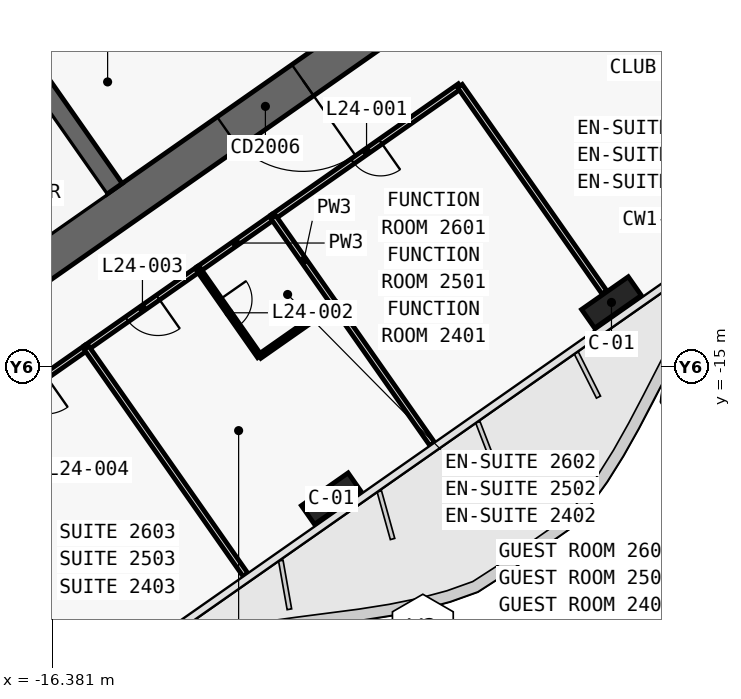
"""IFC4 building model, lengths in metres.
Left out: names, types, materials, properties, quantities, classifications, styles, units other than length and angle.
Written with IfcOpenShell. Run it as: python <this file> out.ifc"""

import sys

from ifc_helpers import new_model, si_unit, direction, frame, frame_2d, origin, origin_2d, place, context, subcontext, project, spatial, polyline, rectangle, outline, extrude, element, fill, save


model = new_model("IFC4")
c1 = context("Model", 3, precision=1e-05, world=origin(), true_north=direction((0.0, 1.0)))
c2 = subcontext(c1, "Body", "Model", "MODEL_VIEW")
j1 = project(units=[si_unit("LENGTHUNIT", "METRE"), si_unit("PLANEANGLEUNIT", "RADIAN")], contexts=[c1])
p1 = place(None, origin())
s1 = spatial("IfcSite", under=j1, at=p1, CompositionType="ELEMENT")
p2 = place(p1, origin())
s2 = spatial("IfcBuilding", under=s1, at=p2, CompositionType="ELEMENT")
p3 = place(p2, frame((0.0, 0.0, 112.1)))
s3 = spatial("IfcBuildingStorey", under=s2, at=p3, CompositionType="ELEMENT", Elevation=112.1)
p4 = place(p3, frame((0.037, 11.867, 0.0), z_axis=(0.0, 0.0, 1.0), x_axis=(-0.819155306259, -0.573571777746, 0.0)))
e1 = element("IfcWall", 1, at=p4, inside=s3, PredefinedType="SHEAR", context=c2, shape_type="SweptSolid", body=[
    extrude(outline(polyline([(33.837, 0.5), (0.7, 0.5), (0.0, -0.5), (33.837, -0.5), (33.837, 0.5)])), origin(), (0.0, 0.0, 1.0), 3.6),
])
p5 = place(p3, frame((0.037, -0.585, 0.0), z_axis=(0.0, 0.0, 1.0), x_axis=(-0.819157152511, -0.573569140985, 0.0)))
e2 = element("IfcWall", 2, at=p5, inside=s3, PredefinedType="SHEAR", context=c2, shape_type="SweptSolid", body=[
    extrude(outline(polyline([(26.695, 0.5), (0.7, 0.5), (0.0, -0.5), (26.695, -0.5), (26.695, 0.5)])), origin(), (0.0, 0.0, 1.0), 3.6),
])
p6 = place(p5, frame((2.995, 0.0, 0.0)))
e3 = element("IfcOpeningElement", 3, at=p6, cuts=e2, PredefinedType="OPENING", context=c2, shape_type="SweptSolid", body=[
    extrude(rectangle(XDim=2.4, YDim=2.1, at=frame_2d((1.2, 1.05))), frame((0.0, 0.51, 0.0), z_axis=(0.0, -1.0, 0.0), x_axis=(1.0, 0.0, 0.0)), (0.0, 0.0, 1.0), 1.02),
])
p7 = place(p5, frame((11.995, 0.0, 0.0)))
e4 = element("IfcOpeningElement", 4, at=p7, cuts=e2, PredefinedType="OPENING", context=c2, shape_type="SweptSolid", body=[
    extrude(rectangle(XDim=2.4, YDim=2.1, at=frame_2d((1.2, 1.05))), frame((0.0, 0.51, 0.0), z_axis=(0.0, -1.0, 0.0), x_axis=(1.0, 0.0, 0.0)), (0.0, 0.0, 1.0), 1.02),
])
p8 = place(p3, frame((-14.745, -10.324, 0.0), z_axis=(0.0, 0.0, 1.0), x_axis=(-0.57356780395, 0.819158088694, 0.0)))
e5 = element("IfcWall", 5, at=p8, inside=s3, PredefinedType="SHEAR", context=c2, shape_type="SweptSolid", body=[
    extrude(outline(polyline([(4.35, 0.25), (0.0, 0.25), (0.0, -0.25), (4.35, -0.25), (4.35, 0.25)])), origin(), (0.0, 0.0, 1.0), 3.6),
])
p9 = place(p3, frame((-2.638, 3.768, 0.0), z_axis=(0.0, 0.0, 1.0), x_axis=(-0.819148977158, -0.573580816643, 0.0)))
e6 = element("IfcWall", 6, at=p9, inside=s3, PredefinedType="SHEAR", context=c2, shape_type="SweptSolid", body=[
    extrude(outline(polyline([(26.0, 0.25), (0.0, 0.25), (0.0, -0.25), (26.0, -0.25), (26.0, 0.25)])), origin(), (0.0, 0.0, 1.0), 3.6),
])
p10 = place(p9, frame((1.169, 0.0, 0.0)))
e7 = element("IfcOpeningElement", 7, at=p10, cuts=e6, PredefinedType="OPENING", context=c2, shape_type="SweptSolid", body=[
    extrude(rectangle(XDim=1.1, YDim=2.1, at=frame_2d((0.55, 1.05))), frame((0.0, 0.26, 0.0), z_axis=(0.0, -1.0, 0.0), x_axis=(1.0, 0.0, 0.0)), (0.0, 0.0, 1.0), 0.52),
])
p11 = place(p9, frame((3.206, 0.0, 0.0)))
e8 = element("IfcOpeningElement", 8, at=p11, cuts=e6, PredefinedType="OPENING", context=c2, shape_type="SweptSolid", body=[
    extrude(rectangle(XDim=1.1, YDim=2.1, at=frame_2d((0.55, 1.05))), frame((0.0, 0.26, 0.0), z_axis=(0.0, -1.0, 0.0), x_axis=(1.0, 0.0, 0.0)), (0.0, 0.0, 1.0), 0.52),
])
p12 = place(p9, frame((5.244, 0.0, 0.0)))
e9 = element("IfcOpeningElement", 9, at=p12, cuts=e6, PredefinedType="OPENING", context=c2, shape_type="SweptSolid", body=[
    extrude(rectangle(XDim=1.1, YDim=2.1, at=frame_2d((0.55, 1.05))), frame((0.0, 0.26, 0.0), z_axis=(0.0, -1.0, 0.0), x_axis=(1.0, 0.0, 0.0)), (0.0, 0.0, 1.0), 0.52),
])
p13 = place(p9, frame((7.281, 0.0, 0.0)))
e10 = element("IfcOpeningElement", 10, at=p13, cuts=e6, PredefinedType="OPENING", context=c2, shape_type="SweptSolid", body=[
    extrude(rectangle(XDim=1.1, YDim=2.1, at=frame_2d((0.55, 1.05))), frame((0.0, 0.26, 0.0), z_axis=(0.0, -1.0, 0.0), x_axis=(1.0, 0.0, 0.0)), (0.0, 0.0, 1.0), 0.52),
])
p14 = place(p9, frame((9.688, 0.0, 0.0)))
e11 = element("IfcOpeningElement", 11, at=p14, cuts=e6, PredefinedType="OPENING", context=c2, shape_type="SweptSolid", body=[
    extrude(rectangle(XDim=1.1, YDim=2.1, at=frame_2d((0.55, 1.05))), frame((0.0, 0.26, 0.0), z_axis=(0.0, -1.0, 0.0), x_axis=(1.0, 0.0, 0.0)), (0.0, 0.0, 1.0), 0.52),
])
p15 = place(p9, frame((11.863, 0.0, 0.0)))
e12 = element("IfcOpeningElement", 12, at=p15, cuts=e6, PredefinedType="OPENING", context=c2, shape_type="SweptSolid", body=[
    extrude(rectangle(XDim=1.1, YDim=2.1, at=frame_2d((0.55, 1.05))), frame((0.0, 0.26, 0.0), z_axis=(0.0, -1.0, 0.0), x_axis=(1.0, 0.0, 0.0)), (0.0, 0.0, 1.0), 0.52),
])
p16 = place(p9, frame((14.038, 0.0, 0.0)))
e13 = element("IfcOpeningElement", 13, at=p16, cuts=e6, PredefinedType="OPENING", context=c2, shape_type="SweptSolid", body=[
    extrude(rectangle(XDim=1.1, YDim=2.1, at=frame_2d((0.55, 1.05))), frame((0.0, 0.26, 0.0), z_axis=(0.0, -1.0, 0.0), x_axis=(1.0, 0.0, 0.0)), (0.0, 0.0, 1.0), 0.52),
])
p17 = place(p9, frame((16.212, 0.0, 0.0)))
e14 = element("IfcOpeningElement", 14, at=p17, cuts=e6, PredefinedType="OPENING", context=c2, shape_type="SweptSolid", body=[
    extrude(rectangle(XDim=1.1, YDim=2.1, at=frame_2d((0.55, 1.05))), frame((0.0, 0.26, 0.0), z_axis=(0.0, -1.0, 0.0), x_axis=(1.0, 0.0, 0.0)), (0.0, 0.0, 1.0), 0.52),
])
for number, where, z_axis, x_axis in (
    (15, (-1.665, -13.313, 0.0), (0.0, 0.0, 1.0), (-0.819, -0.574, 0.0)),
    (16, (-9.038, -18.475, 0.0), (0.0, 0.0, 1.0), (-0.819, -0.574, 0.0)),
):
    element("IfcColumn", number, at=place(p3, frame(where, z_axis=z_axis, x_axis=x_axis)), inside=s3, PredefinedType="COLUMN", context=c2, shape_type="SweptSolid", body=[
        extrude(rectangle(XDim=1.5, YDim=0.6, at=origin_2d()), origin(), (0.0, 0.0, 1.0), 3.6),
    ])
p18 = place(p3, frame((-5.652, -7.62, 0.0), z_axis=(0.0, 0.0, 1.0), x_axis=(-0.819147828287, -0.573582457378, 0.0)))
e17 = element("IfcWall", 17, at=p18, inside=s3, PredefinedType="PARTITIONING", context=c2, shape_type="SweptSolid", body=[
    extrude(rectangle(XDim=6.002, YDim=0.15, at=frame_2d((3.001, 0.0))), origin(), (0.0, 0.0, 1.0), 2.6),
])
p19 = place(p18, frame((2.551, 0.0, 0.0)))
e18 = element("IfcOpeningElement", 18, at=p19, cuts=e17, PredefinedType="OPENING", context=c2, shape_type="SweptSolid", body=[
    extrude(rectangle(XDim=0.9, YDim=2.1, at=frame_2d((0.45, 1.05))), frame((0.0, 0.085, 0.0), z_axis=(0.0, -1.0, 0.0), x_axis=(1.0, 0.0, 0.0)), (0.0, 0.0, 1.0), 0.17),
])
p20 = place(p3, frame((-12.532, -12.437, 0.0), z_axis=(0.0, 0.0, 1.0), x_axis=(-0.819145961204, -0.573585123798, 0.0)))
e19 = element("IfcWall", 19, at=p20, inside=s3, PredefinedType="PARTITIONING", context=c2, shape_type="SweptSolid", body=[
    extrude(rectangle(XDim=3.603, YDim=0.15, at=frame_2d((1.802, 0.0))), origin(), (0.0, 0.0, 1.0), 2.6),
])
p21 = place(p20, frame((1.301, 0.0, 0.0)))
e20 = element("IfcOpeningElement", 20, at=p21, cuts=e19, PredefinedType="OPENING", context=c2, shape_type="SweptSolid", body=[
    extrude(rectangle(XDim=1.0, YDim=2.1, at=frame_2d((0.5, 1.05))), frame((0.0, 0.085, 0.0), z_axis=(0.0, -1.0, 0.0), x_axis=(1.0, 0.0, 0.0)), (0.0, 0.0, 1.0), 0.17),
])
p22 = place(p3, frame((-10.565, -11.06, 0.0), z_axis=(0.0, 0.0, 1.0), x_axis=(-0.819193748, -0.57351687267, 0.0)))
e21 = element("IfcWall", 21, at=p22, inside=s3, PredefinedType="PARTITIONING", context=c2, shape_type="SweptSolid", body=[
    extrude(rectangle(XDim=2.404, YDim=0.15, at=frame_2d((1.202, 0.0))), origin(), (0.0, 0.0, 1.0), 3.32),
])
p23 = place(p3, frame((-15.48, -14.501, 0.0), z_axis=(0.0, 0.0, 1.0), x_axis=(-0.819145961204, -0.573585123798, 0.0)))
e22 = element("IfcWall", 22, at=p23, inside=s3, PredefinedType="PARTITIONING", context=c2, shape_type="SweptSolid", body=[
    extrude(rectangle(XDim=3.603, YDim=0.15, at=frame_2d((1.802, 0.0))), origin(), (0.0, 0.0, 1.0), 3.32),
])
p24 = place(p23, frame((1.302, 0.0, 0.0)))
e23 = element("IfcOpeningElement", 23, at=p24, cuts=e22, PredefinedType="OPENING", context=c2, shape_type="SweptSolid", body=[
    extrude(rectangle(XDim=1.0, YDim=2.1, at=frame_2d((0.5, 1.05))), frame((0.0, 0.085, 0.0), z_axis=(0.0, -1.0, 0.0), x_axis=(1.0, 0.0, 0.0)), (0.0, 0.0, 1.0), 0.17),
])
p25 = place(p3, frame((-1.849, -13.051, 0.0), z_axis=(0.0, 0.0, 1.0), x_axis=(-0.573575988258, 0.819152358047, 0.0)))
e24 = element("IfcWall", 24, at=p25, inside=s3, PredefinedType="PARTITIONING", context=c2, shape_type="SweptSolid", body=[
    extrude(rectangle(XDim=6.632, YDim=0.15, at=frame_2d((3.316, 0.0))), origin(), (0.0, 0.0, 1.0), 2.6),
])
p26 = place(p3, frame((-6.379, -17.041, 0.0), z_axis=(0.0, 0.0, 1.0), x_axis=(-0.573593387921, 0.81914017441, 0.0)))
e25 = element("IfcWall", 25, at=p26, inside=s3, PredefinedType="PARTITIONING", context=c2, shape_type="SweptSolid", body=[
    extrude(rectangle(XDim=4.501, YDim=0.15, at=frame_2d((2.25, 0.0))), origin(), (0.0, 0.0, 1.0), 2.5),
])
p27 = place(p3, frame((-8.959, -13.356, 0.0), z_axis=(0.0, 0.0, 1.0), x_axis=(-0.573555899632, 0.819166423871, 0.0)))
e26 = element("IfcWall", 26, at=p27, inside=s3, PredefinedType="PARTITIONING", context=c2, shape_type="SweptSolid", body=[
    extrude(rectangle(XDim=2.802, YDim=0.15, at=frame_2d((1.401, 0.0))), origin(), (0.0, 0.0, 1.0), 3.32),
])
p28 = place(p3, frame((-12.533, -12.438, 0.0), z_axis=(0.0, 0.0, 1.0), x_axis=(0.573550118428, -0.819170471667, 0.0)))
e27 = element("IfcWall", 27, at=p28, inside=s3, PredefinedType="PARTITIONING", context=c2, shape_type="SweptSolid", body=[
    extrude(rectangle(XDim=2.8, YDim=0.12, at=frame_2d((1.4, 0.0))), origin(), (0.0, 0.0, 1.0), 3.32),
])
p29 = place(p28, frame((0.975, 0.0, 0.0)))
e28 = element("IfcOpeningElement", 28, at=p29, cuts=e27, PredefinedType="OPENING", context=c2, shape_type="SweptSolid", body=[
    extrude(rectangle(XDim=0.85, YDim=2.05, at=frame_2d((0.425, 1.025))), frame((0.0, 0.07, 0.0), z_axis=(0.0, -1.0, 0.0), x_axis=(1.0, 0.0, 0.0)), (0.0, 0.0, 1.0), 0.14),
])
p30 = place(p3, frame((-10.926, -14.732, 0.0), z_axis=(0.0, 0.0, 1.0), x_axis=(0.819107643868, 0.573639841501, 0.0)))
e29 = element("IfcWall", 29, at=p30, inside=s3, PredefinedType="PARTITIONING", context=c2, shape_type="SweptSolid", body=[
    extrude(rectangle(XDim=2.4, YDim=0.12, at=frame_2d((1.2, 0.0))), origin(), (0.0, 0.0, 1.0), 3.32),
])
p31 = place(p3, frame((-11.294, -20.482, 0.0), z_axis=(0.0, 0.0, 1.0), x_axis=(-0.573572324301, 0.819154923562, 0.0)))
e30 = element("IfcWall", 30, at=p31, inside=s3, PredefinedType="PARTITIONING", context=c2, shape_type="SweptSolid", body=[
    extrude(rectangle(XDim=7.3, YDim=0.15, at=frame_2d((3.65, 0.0))), origin(), (0.0, 0.0, 1.0), 2.5),
])
p32 = place(p7, origin())
e31 = element("IfcDoor", 31, at=p32, inside=s3, OperationType="DOUBLE_DOOR_SINGLE_SWING", PredefinedType="DOOR", context=c2, shape_type="SweptSolid", body=[
    extrude(rectangle(XDim=2.4, YDim=2.1, at=frame_2d((1.2, 1.05))), frame((0.0, 0.025, 0.0), z_axis=(0.0, -1.0, 0.0), x_axis=(1.0, 0.0, 0.0)), (0.0, 0.0, 1.0), 0.05),
])
fill(e4, e31)
p33 = place(p19, origin())
e32 = element("IfcDoor", 32, at=p33, inside=s3, OperationType="SINGLE_SWING_LEFT", PredefinedType="DOOR", context=c2, shape_type="SweptSolid", body=[
    extrude(rectangle(XDim=0.9, YDim=2.1, at=frame_2d((0.45, 1.05))), frame((0.0, 0.025, 0.0), z_axis=(0.0, -1.0, 0.0), x_axis=(1.0, 0.0, 0.0)), (0.0, 0.0, 1.0), 0.05),
])
fill(e18, e32)
p34 = place(p29, origin())
e33 = element("IfcDoor", 33, at=p34, inside=s3, OperationType="SINGLE_SWING_RIGHT", PredefinedType="DOOR", context=c2, shape_type="SweptSolid", body=[
    extrude(rectangle(XDim=0.85, YDim=2.05, at=frame_2d((0.425, 1.025))), frame((0.0, 0.025, 0.0), z_axis=(0.0, -1.0, 0.0), x_axis=(1.0, 0.0, 0.0)), (0.0, 0.0, 1.0), 0.05),
])
fill(e28, e33)
p35 = place(p21, origin())
e34 = element("IfcDoor", 34, at=p35, inside=s3, OperationType="SINGLE_SWING_LEFT", PredefinedType="DOOR", context=c2, shape_type="SweptSolid", body=[
    extrude(rectangle(XDim=1.0, YDim=2.1, at=frame_2d((0.5, 1.05))), frame((0.0, 0.025, 0.0), z_axis=(0.0, -1.0, 0.0), x_axis=(1.0, 0.0, 0.0)), (0.0, 0.0, 1.0), 0.05),
])
fill(e20, e34)
save(model, sys.argv[1])
